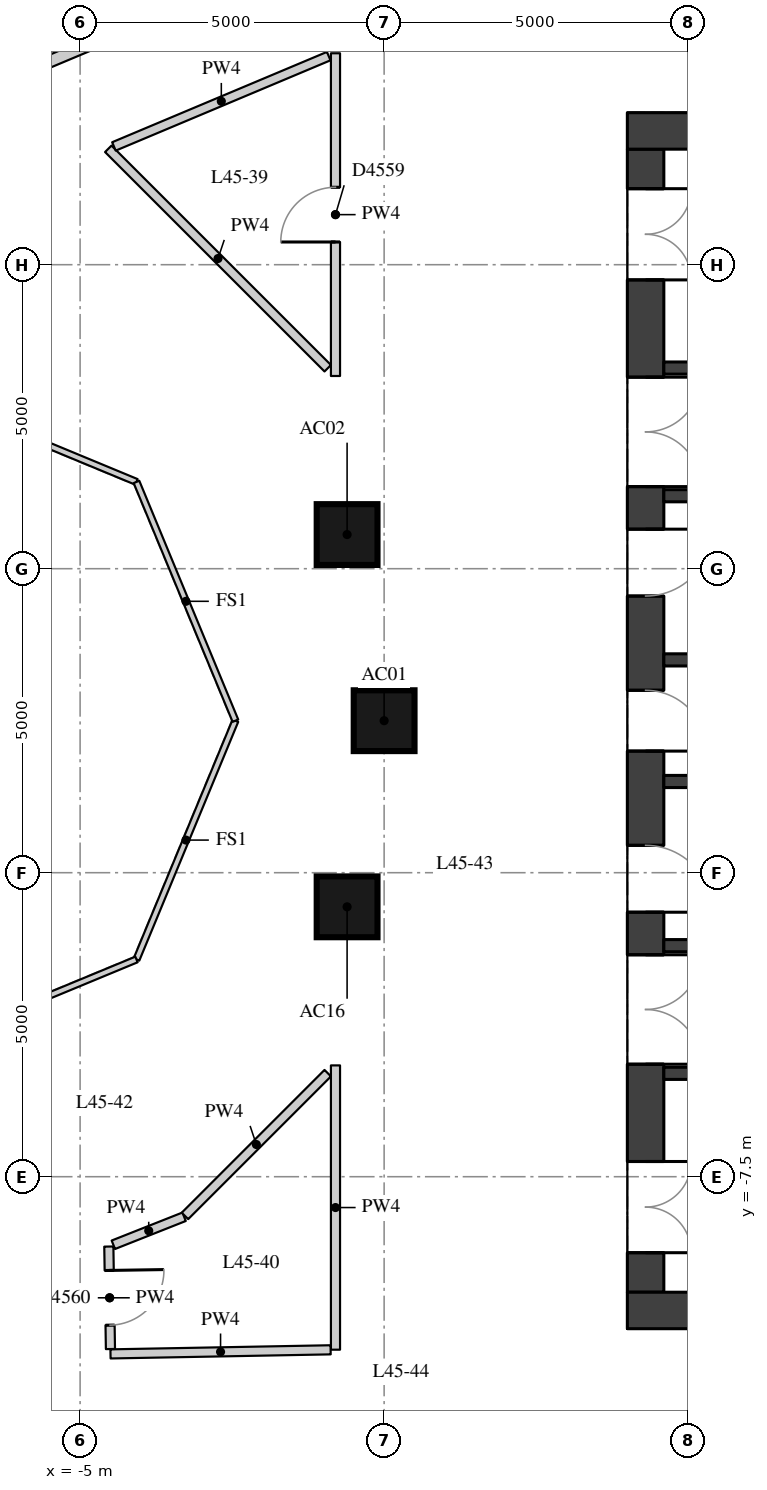
"""IFC4 building model, lengths in metres.
Left out: names, types, materials, properties, quantities, classifications, styles, units other than length and angle.
Written with IfcOpenShell. Run it as: python <this file> out.ifc"""

import sys

from ifc_helpers import new_model, si_unit, direction, frame, frame_2d, origin, origin_2d, place, context, subcontext, project, spatial, rectangle, extrude, element, fill, save


model = new_model("IFC4")
c1 = context("Model", 3, precision=1e-05, world=origin(), true_north=direction((0.0, 1.0)))
c2 = subcontext(c1, "Body", "Model", "MODEL_VIEW")
j1 = project(units=[si_unit("LENGTHUNIT", "METRE"), si_unit("PLANEANGLEUNIT", "RADIAN")], contexts=[c1])
p1 = place(None, origin())
s1 = spatial("IfcSite", under=j1, at=p1, CompositionType="ELEMENT")
p2 = place(p1, origin())
s2 = spatial("IfcBuilding", under=s1, at=p2, CompositionType="ELEMENT")
p3 = place(p2, frame((0.0, 0.0, 161.6)))
s3 = spatial("IfcBuildingStorey", under=s2, at=p3, CompositionType="ELEMENT", Elevation=161.6)
for number, where, z_axis, x_axis in (
    (1, (0.0, 0.0, 0.0), (0.0, 0.0, 1.0), (1.0, 0.0, 0.0)),
    (2, (-0.609, 3.062, 0.0), (0.0, 0.0, 1.0), (1.0, 0.0, 0.0)),
    (3, (-0.609, -3.062, 0.0), (0.0, 0.0, 1.0), (1.0, 0.0, 0.0)),
):
    element("IfcColumn", number, at=place(p3, frame(where, z_axis=z_axis, x_axis=x_axis)), inside=s3, PredefinedType="COLUMN", context=c2, shape_type="SweptSolid", body=[
        extrude(rectangle(XDim=1.0, YDim=1.0, at=origin_2d()), origin(), (0.0, 0.0, 1.0), 3.3),
    ])
p4 = place(p3, frame((4.3, -9.4, 0.0), z_axis=(0.0, 0.0, 1.0), x_axis=(0.0, 1.0, 0.0)))
e4 = element("IfcWall", 4, at=p4, inside=s3, PredefinedType="SHEAR", context=c2, shape_type="SweptSolid", body=[
    extrude(rectangle(XDim=18.8, YDim=0.6, at=frame_2d((9.4, 0.0))), origin(), (0.0, 0.0, 1.0), 3.02),
])
p5 = place(p4, frame((0.65, 0.0, 0.0)))
e5 = element("IfcOpeningElement", 5, at=p5, cuts=e4, PredefinedType="OPENING", context=c2, shape_type="SweptSolid", body=[
    extrude(rectangle(XDim=1.5, YDim=2.1, at=frame_2d((0.75, 1.05))), frame((0.0, 0.31, 0.0), z_axis=(0.0, -1.0, 0.0), x_axis=(1.0, 0.0, 0.0)), (0.0, 0.0, 1.0), 0.62),
])
p6 = place(p4, frame((3.75, 0.0, 0.0)))
e6 = element("IfcOpeningElement", 6, at=p6, cuts=e4, PredefinedType="OPENING", context=c2, shape_type="SweptSolid", body=[
    extrude(rectangle(XDim=1.8, YDim=2.1, at=frame_2d((0.9, 1.05))), frame((0.0, 0.31, 0.0), z_axis=(0.0, -1.0, 0.0), x_axis=(1.0, 0.0, 0.0)), (0.0, 0.0, 1.0), 0.62),
])
p7 = place(p4, frame((6.25, 0.0, 0.0)))
e7 = element("IfcOpeningElement", 7, at=p7, cuts=e4, PredefinedType="OPENING", context=c2, shape_type="SweptSolid", body=[
    extrude(rectangle(XDim=1.1, YDim=2.1, at=frame_2d((0.55, 1.05))), frame((0.0, 0.31, 0.0), z_axis=(0.0, -1.0, 0.0), x_axis=(1.0, 0.0, 0.0)), (0.0, 0.0, 1.0), 0.62),
])
p8 = place(p4, frame((8.9, 0.0, 0.0)))
e8 = element("IfcOpeningElement", 8, at=p8, cuts=e4, PredefinedType="OPENING", context=c2, shape_type="SweptSolid", body=[
    extrude(rectangle(XDim=1.0, YDim=2.1, at=frame_2d((0.5, 1.05))), frame((0.0, 0.31, 0.0), z_axis=(0.0, -1.0, 0.0), x_axis=(1.0, 0.0, 0.0)), (0.0, 0.0, 1.0), 0.62),
])
p9 = place(p4, frame((11.45, 0.0, 0.0)))
e9 = element("IfcOpeningElement", 9, at=p9, cuts=e4, PredefinedType="OPENING", context=c2, shape_type="SweptSolid", body=[
    extrude(rectangle(XDim=1.1, YDim=2.1, at=frame_2d((0.55, 1.05))), frame((0.0, 0.31, 0.0), z_axis=(0.0, -1.0, 0.0), x_axis=(1.0, 0.0, 0.0)), (0.0, 0.0, 1.0), 0.62),
])
p10 = place(p4, frame((13.25, 0.0, 0.0)))
e10 = element("IfcOpeningElement", 10, at=p10, cuts=e4, PredefinedType="OPENING", context=c2, shape_type="SweptSolid", body=[
    extrude(rectangle(XDim=1.8, YDim=2.1, at=frame_2d((0.9, 1.05))), frame((0.0, 0.31, 0.0), z_axis=(0.0, -1.0, 0.0), x_axis=(1.0, 0.0, 0.0)), (0.0, 0.0, 1.0), 0.62),
])
p11 = place(p4, frame((16.65, 0.0, 0.0)))
e11 = element("IfcOpeningElement", 11, at=p11, cuts=e4, PredefinedType="OPENING", context=c2, shape_type="SweptSolid", body=[
    extrude(rectangle(XDim=1.5, YDim=2.1, at=frame_2d((0.75, 1.05))), frame((0.0, 0.31, 0.0), z_axis=(0.0, -1.0, 0.0), x_axis=(1.0, 0.0, 0.0)), (0.0, 0.0, 1.0), 0.62),
])
for number, where, z_axis, x_axis in (
    (12, (4.0, 9.7, 0.0), (0.0, 0.0, 1.0), (1.0, 0.0, 0.0)),
    (13, (4.0, -9.7, 0.0), (0.0, 0.0, 1.0), (1.0, 0.0, 0.0)),
):
    element("IfcWall", number, at=place(p3, frame(where, z_axis=z_axis, x_axis=x_axis)), inside=s3, PredefinedType="SHEAR", context=c2, shape_type="SweptSolid", body=[
        extrude(rectangle(XDim=12.0, YDim=0.6, at=frame_2d((6.0, 0.0))), origin(), (0.0, 0.0, 1.0), 3.02),
    ])
p12 = place(p3, frame((4.6, 5.8, 0.0), z_axis=(0.0, 0.0, 1.0), x_axis=(1.0, 0.0, 0.0)))
e14 = element("IfcWall", 14, at=p12, inside=s3, PredefinedType="SHEAR", context=c2, shape_type="SweptSolid", body=[
    extrude(rectangle(XDim=10.8, YDim=0.2, at=frame_2d((5.4, 0.0))), origin(), (0.0, 0.0, 1.0), 3.02),
])
p13 = place(p12, frame((7.05, 0.0, 0.0)))
e15 = element("IfcOpeningElement", 15, at=p13, cuts=e14, PredefinedType="OPENING", context=c2, shape_type="SweptSolid", body=[
    extrude(rectangle(XDim=1.1, YDim=2.1, at=frame_2d((0.55, 1.05))), frame((0.0, 0.11, 0.0), z_axis=(0.0, -1.0, 0.0), x_axis=(1.0, 0.0, 0.0)), (0.0, 0.0, 1.0), 0.22),
])
p14 = place(p12, frame((9.05, 0.0, 0.0)))
e16 = element("IfcOpeningElement", 16, at=p14, cuts=e14, PredefinedType="OPENING", context=c2, shape_type="SweptSolid", body=[
    extrude(rectangle(XDim=1.1, YDim=2.1, at=frame_2d((0.55, 1.05))), frame((0.0, 0.11, 0.0), z_axis=(0.0, -1.0, 0.0), x_axis=(1.0, 0.0, 0.0)), (0.0, 0.0, 1.0), 0.22),
])
p15 = place(p3, frame((4.6, 3.7, 0.0), z_axis=(0.0, 0.0, 1.0), x_axis=(1.0, 0.0, 0.0)))
e17 = element("IfcWall", 17, at=p15, inside=s3, PredefinedType="SHEAR", context=c2, shape_type="SweptSolid", body=[
    extrude(rectangle(XDim=10.8, YDim=0.2, at=frame_2d((5.4, 0.0))), origin(), (0.0, 0.0, 1.0), 3.02),
])
p16 = place(p15, frame((6.6, 0.0, 0.0)))
e18 = element("IfcOpeningElement", 18, at=p16, cuts=e17, PredefinedType="OPENING", context=c2, shape_type="SweptSolid", body=[
    extrude(rectangle(XDim=1.1, YDim=2.1, at=frame_2d((0.55, 1.05))), frame((0.0, 0.11, 0.0), z_axis=(0.0, -1.0, 0.0), x_axis=(1.0, 0.0, 0.0)), (0.0, 0.0, 1.0), 0.22),
])
p17 = place(p15, frame((8.9, 0.0, 0.0)))
e19 = element("IfcOpeningElement", 19, at=p17, cuts=e17, PredefinedType="OPENING", context=c2, shape_type="SweptSolid", body=[
    extrude(rectangle(XDim=1.1, YDim=2.1, at=frame_2d((0.55, 1.05))), frame((0.0, 0.11, 0.0), z_axis=(0.0, -1.0, 0.0), x_axis=(1.0, 0.0, 0.0)), (0.0, 0.0, 1.0), 0.22),
])
for number, where, z_axis, x_axis in (
    (20, (4.6, 1.0, 0.0), (0.0, 0.0, 1.0), (1.0, 0.0, 0.0)),
    (21, (4.6, -1.0, 0.0), (0.0, 0.0, 1.0), (1.0, 0.0, 0.0)),
):
    element("IfcWall", number, at=place(p3, frame(where, z_axis=z_axis, x_axis=x_axis)), inside=s3, PredefinedType="SHEAR", context=c2, shape_type="SweptSolid", body=[
        extrude(rectangle(XDim=10.8, YDim=0.2, at=frame_2d((5.4, 0.0))), origin(), (0.0, 0.0, 1.0), 3.02),
    ])
p18 = place(p3, frame((4.6, -3.7, 0.0), z_axis=(0.0, 0.0, 1.0), x_axis=(1.0, 0.0, 0.0)))
e22 = element("IfcWall", 22, at=p18, inside=s3, PredefinedType="SHEAR", context=c2, shape_type="SweptSolid", body=[
    extrude(rectangle(XDim=10.8, YDim=0.2, at=frame_2d((5.4, 0.0))), origin(), (0.0, 0.0, 1.0), 3.02),
])
p19 = place(p18, frame((6.6, 0.0, 0.0)))
e23 = element("IfcOpeningElement", 23, at=p19, cuts=e22, PredefinedType="OPENING", context=c2, shape_type="SweptSolid", body=[
    extrude(rectangle(XDim=1.1, YDim=2.1, at=frame_2d((0.55, 1.05))), frame((0.0, 0.11, 0.0), z_axis=(0.0, -1.0, 0.0), x_axis=(1.0, 0.0, 0.0)), (0.0, 0.0, 1.0), 0.22),
])
p20 = place(p18, frame((8.9, 0.0, 0.0)))
e24 = element("IfcOpeningElement", 24, at=p20, cuts=e22, PredefinedType="OPENING", context=c2, shape_type="SweptSolid", body=[
    extrude(rectangle(XDim=1.1, YDim=2.1, at=frame_2d((0.55, 1.05))), frame((0.0, 0.11, 0.0), z_axis=(0.0, -1.0, 0.0), x_axis=(1.0, 0.0, 0.0)), (0.0, 0.0, 1.0), 0.22),
])
p21 = place(p3, frame((4.6, -5.8, 0.0), z_axis=(0.0, 0.0, 1.0), x_axis=(1.0, 0.0, 0.0)))
e25 = element("IfcWall", 25, at=p21, inside=s3, PredefinedType="SHEAR", context=c2, shape_type="SweptSolid", body=[
    extrude(rectangle(XDim=10.8, YDim=0.2, at=frame_2d((5.4, 0.0))), origin(), (0.0, 0.0, 1.0), 3.02),
])
p22 = place(p3, frame((-5.343, -12.093, 0.0), z_axis=(0.0, 0.0, 1.0), x_axis=(-0.796104996328, 0.605158520407, 0.0)))
e26 = element("IfcWall", 26, at=p22, inside=s3, PredefinedType="PARTITIONING", context=c2, shape_type="SweptSolid", body=[
    extrude(rectangle(XDim=2.961, YDim=0.2, at=frame_2d((1.48, 0.0))), origin(), (0.0, 0.0, 1.0), 3.02),
])
p23 = place(p3, frame((-7.57, 9.975, 0.0), z_axis=(0.0, 0.0, 1.0), x_axis=(0.921815879705, 0.387628022624, 0.0)))
e27 = element("IfcWall", 27, at=p23, inside=s3, PredefinedType="PARTITIONING", context=c2, shape_type="SweptSolid", body=[
    extrude(rectangle(XDim=8.321, YDim=0.2, at=frame_2d((4.16, 0.0))), origin(), (0.0, 0.0, 1.0), 3.02),
])
p24 = place(p23, frame((4.721, 0.0, 0.0)))
e28 = element("IfcOpeningElement", 28, at=p24, cuts=e27, PredefinedType="OPENING", context=c2, shape_type="SweptSolid", body=[
    extrude(rectangle(XDim=1.8, YDim=2.1, at=frame_2d((0.9, 1.05))), frame((0.0, 0.11, 0.0), z_axis=(0.0, -1.0, 0.0), x_axis=(1.0, 0.0, 0.0)), (0.0, 0.0, 1.0), 0.22),
])
p25 = place(p3, frame((-0.8, 10.977, 0.0), z_axis=(0.0, 0.0, 1.0), x_axis=(0.0, -1.0, 0.0)))
e29 = element("IfcWall", 29, at=p25, inside=s3, PredefinedType="PARTITIONING", context=c2, shape_type="SweptSolid", body=[
    extrude(rectangle(XDim=5.308, YDim=0.15, at=frame_2d((2.654, 0.0))), origin(), (0.0, 0.0, 1.0), 3.02),
])
p26 = place(p25, frame((2.204, 0.0, 0.0)))
e30 = element("IfcOpeningElement", 30, at=p26, cuts=e29, PredefinedType="OPENING", context=c2, shape_type="SweptSolid", body=[
    extrude(rectangle(XDim=0.9, YDim=2.1, at=frame_2d((0.45, 1.05))), frame((0.0, 0.085, 0.0), z_axis=(0.0, -1.0, 0.0), x_axis=(1.0, 0.0, 0.0)), (0.0, 0.0, 1.0), 0.17),
])
p27 = place(p3, frame((-0.927, 5.797, 0.0), z_axis=(0.0, 0.0, 1.0), x_axis=(-0.707106781187, 0.707106781187, 0.0)))
e31 = element("IfcWall", 31, at=p27, inside=s3, PredefinedType="PARTITIONING", context=c2, shape_type="SweptSolid", body=[
    extrude(rectangle(XDim=5.104, YDim=0.15, at=frame_2d((2.552, 0.0))), origin(), (0.0, 0.0, 1.0), 3.02),
])
p28 = place(p3, frame((-4.444, 9.445, 0.0), z_axis=(0.0, 0.0, 1.0), x_axis=(0.921822351054, 0.387612632788, 0.0)))
e32 = element("IfcWall", 32, at=p28, inside=s3, PredefinedType="PARTITIONING", context=c2, shape_type="SweptSolid", body=[
    extrude(rectangle(XDim=3.832, YDim=0.15, at=frame_2d((1.916, 0.0))), origin(), (0.0, 0.0, 1.0), 3.02),
])
p29 = place(p3, frame((-0.8, -5.669, 0.0), z_axis=(0.0, 0.0, 1.0), x_axis=(0.0, -1.0, 0.0)))
e33 = element("IfcWall", 33, at=p29, inside=s3, PredefinedType="PARTITIONING", context=c2, shape_type="SweptSolid", body=[
    extrude(rectangle(XDim=4.676, YDim=0.15, at=frame_2d((2.338, 0.0))), origin(), (0.0, 0.0, 1.0), 3.02),
])
p30 = place(p3, frame((-0.88, -10.347, 0.0), z_axis=(0.0, 0.0, 1.0), x_axis=(-0.999826791681, -0.018611465199, 0.0)))
e34 = element("IfcWall", 34, at=p30, inside=s3, PredefinedType="PARTITIONING", context=c2, shape_type="SweptSolid", body=[
    extrude(rectangle(XDim=3.621, YDim=0.15, at=frame_2d((1.81, 0.0))), origin(), (0.0, 0.0, 1.0), 3.02),
])
p31 = place(p3, frame((-4.501, -10.334, 0.0), z_axis=(0.0, 0.0, 1.0), x_axis=(-0.015785981736, 0.999875393627, 0.0)))
e35 = element("IfcWall", 35, at=p31, inside=s3, PredefinedType="PARTITIONING", context=c2, shape_type="SweptSolid", body=[
    extrude(rectangle(XDim=1.686, YDim=0.15, at=frame_2d((0.843, 0.0))), origin(), (0.0, 0.0, 1.0), 3.02),
])
p32 = place(p31, frame((0.393, 0.0, 0.0)))
e36 = element("IfcOpeningElement", 36, at=p32, cuts=e35, PredefinedType="OPENING", context=c2, shape_type="SweptSolid", body=[
    extrude(rectangle(XDim=0.9, YDim=2.1, at=frame_2d((0.45, 1.05))), frame((0.0, 0.085, 0.0), z_axis=(0.0, -1.0, 0.0), x_axis=(1.0, 0.0, 0.0)), (0.0, 0.0, 1.0), 0.17),
])
p33 = place(p3, frame((-4.453, -8.62, 0.0), z_axis=(0.0, 0.0, 1.0), x_axis=(0.929802441214, 0.36805899026, 0.0)))
e37 = element("IfcWall", 37, at=p33, inside=s3, PredefinedType="PARTITIONING", context=c2, shape_type="SweptSolid", body=[
    extrude(rectangle(XDim=1.252, YDim=0.15, at=frame_2d((0.626, 0.0))), origin(), (0.0, 0.0, 1.0), 3.02),
])
p34 = place(p3, frame((-3.275, -8.145, 0.0), z_axis=(0.0, 0.0, 1.0), x_axis=(0.707106781187, 0.707106781187, 0.0)))
e38 = element("IfcWall", 38, at=p34, inside=s3, PredefinedType="PARTITIONING", context=c2, shape_type="SweptSolid", body=[
    extrude(rectangle(XDim=3.32, YDim=0.15, at=frame_2d((1.66, 0.0))), origin(), (0.0, 0.0, 1.0), 3.02),
])
for number, where, z_axis, x_axis in (
    (39, (-2.446, 0.0, 0.0), (0.0, 0.0, 1.0), (-0.383, -0.924, 0.0)),
    (40, (-4.073, -3.927, 0.0), (0.0, 0.0, 1.0), (-0.924, -0.383, 0.0)),
    (41, (-8.0, 5.554, 0.0), (0.0, 0.0, 1.0), (0.924, -0.383, 0.0)),
    (42, (-4.073, 3.927, 0.0), (0.0, 0.0, 1.0), (0.383, -0.924, 0.0)),
):
    element("IfcWall", number, at=place(p3, frame(where, z_axis=z_axis, x_axis=x_axis)), inside=s3, PredefinedType="PARTITIONING", context=c2, shape_type="SweptSolid", body=[
        extrude(rectangle(XDim=4.251, YDim=0.1, at=frame_2d((2.125, 0.0))), origin(), (0.0, 0.0, 1.0), 3.02),
    ])
p35 = place(p5, origin())
e43 = element("IfcDoor", 43, at=p35, inside=s3, OperationType="DOUBLE_DOOR_SINGLE_SWING", PredefinedType="DOOR", context=c2, shape_type="SweptSolid", body=[
    extrude(rectangle(XDim=1.5, YDim=2.1, at=frame_2d((0.75, 1.05))), frame((0.0, 0.025, 0.0), z_axis=(0.0, -1.0, 0.0), x_axis=(1.0, 0.0, 0.0)), (0.0, 0.0, 1.0), 0.05),
])
fill(e5, e43)
p36 = place(p6, origin())
e44 = element("IfcDoor", 44, at=p36, inside=s3, OperationType="DOUBLE_DOOR_SINGLE_SWING", PredefinedType="DOOR", context=c2, shape_type="SweptSolid", body=[
    extrude(rectangle(XDim=1.8, YDim=2.1, at=frame_2d((0.9, 1.05))), frame((0.0, 0.025, 0.0), z_axis=(0.0, -1.0, 0.0), x_axis=(1.0, 0.0, 0.0)), (0.0, 0.0, 1.0), 0.05),
])
fill(e6, e44)
p37 = place(p7, origin())
e45 = element("IfcDoor", 45, at=p37, inside=s3, OperationType="SINGLE_SWING_RIGHT", PredefinedType="DOOR", context=c2, shape_type="SweptSolid", body=[
    extrude(rectangle(XDim=1.1, YDim=2.1, at=frame_2d((0.55, 1.05))), frame((0.0, 0.025, 0.0), z_axis=(0.0, -1.0, 0.0), x_axis=(1.0, 0.0, 0.0)), (0.0, 0.0, 1.0), 0.05),
])
fill(e7, e45)
p38 = place(p8, origin())
e46 = element("IfcDoor", 46, at=p38, inside=s3, OperationType="SINGLE_SWING_RIGHT", PredefinedType="DOOR", context=c2, shape_type="SweptSolid", body=[
    extrude(rectangle(XDim=1.0, YDim=2.1, at=frame_2d((0.5, 1.05))), frame((0.0, 0.025, 0.0), z_axis=(0.0, -1.0, 0.0), x_axis=(1.0, 0.0, 0.0)), (0.0, 0.0, 1.0), 0.05),
])
fill(e8, e46)
p39 = place(p9, origin())
e47 = element("IfcDoor", 47, at=p39, inside=s3, OperationType="SINGLE_SWING_LEFT", PredefinedType="DOOR", context=c2, shape_type="SweptSolid", body=[
    extrude(rectangle(XDim=1.1, YDim=2.1, at=frame_2d((0.55, 1.05))), frame((0.0, 0.025, 0.0), z_axis=(0.0, -1.0, 0.0), x_axis=(1.0, 0.0, 0.0)), (0.0, 0.0, 1.0), 0.05),
])
fill(e9, e47)
p40 = place(p10, origin())
e48 = element("IfcDoor", 48, at=p40, inside=s3, OperationType="DOUBLE_DOOR_SINGLE_SWING", PredefinedType="DOOR", context=c2, shape_type="SweptSolid", body=[
    extrude(rectangle(XDim=1.8, YDim=2.1, at=frame_2d((0.9, 1.05))), frame((0.0, 0.025, 0.0), z_axis=(0.0, -1.0, 0.0), x_axis=(1.0, 0.0, 0.0)), (0.0, 0.0, 1.0), 0.05),
])
fill(e10, e48)
p41 = place(p11, origin())
e49 = element("IfcDoor", 49, at=p41, inside=s3, OperationType="DOUBLE_DOOR_SINGLE_SWING", PredefinedType="DOOR", context=c2, shape_type="SweptSolid", body=[
    extrude(rectangle(XDim=1.5, YDim=2.1, at=frame_2d((0.75, 1.05))), frame((0.0, 0.025, 0.0), z_axis=(0.0, -1.0, 0.0), x_axis=(1.0, 0.0, 0.0)), (0.0, 0.0, 1.0), 0.05),
])
fill(e11, e49)
p42 = place(p26, origin())
e50 = element("IfcDoor", 50, at=p42, inside=s3, OperationType="SINGLE_SWING_LEFT", PredefinedType="DOOR", context=c2, shape_type="SweptSolid", body=[
    extrude(rectangle(XDim=0.9, YDim=2.1, at=frame_2d((0.45, 1.05))), frame((0.0, 0.025, 0.0), z_axis=(0.0, -1.0, 0.0), x_axis=(1.0, 0.0, 0.0)), (0.0, 0.0, 1.0), 0.05),
])
fill(e30, e50)
p43 = place(p32, origin())
e51 = element("IfcDoor", 51, at=p43, inside=s3, OperationType="SINGLE_SWING_LEFT", PredefinedType="DOOR", context=c2, shape_type="SweptSolid", body=[
    extrude(rectangle(XDim=0.9, YDim=2.1, at=frame_2d((0.45, 1.05))), frame((0.0, 0.025, 0.0), z_axis=(0.0, -1.0, 0.0), x_axis=(1.0, 0.0, 0.0)), (0.0, 0.0, 1.0), 0.05),
])
fill(e36, e51)
save(model, sys.argv[1])
